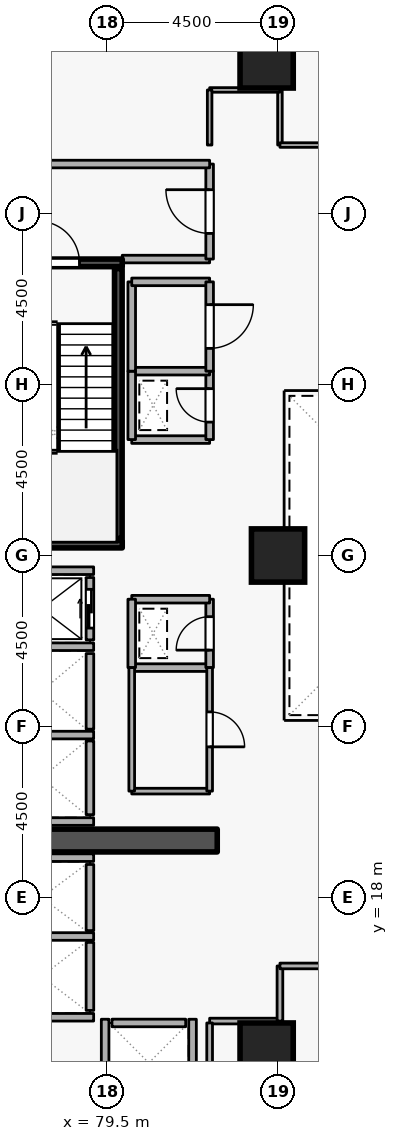
"""IFC4 building model, lengths in metres.
Left out: names, types, materials, properties, quantities, classifications, styles, units other than length and angle.
Written with IfcOpenShell. Run it as: python <this file> out.ifc"""

import sys

from ifc_helpers import new_model, si_unit, direction, frame, frame_2d, origin, origin_2d, place, context, subcontext, project, spatial, rectangle, extrude, element, fill, save


model = new_model("IFC4")
c1 = context("Model", 3, precision=1e-05, world=origin(), true_north=direction((0.0, 1.0)))
c2 = subcontext(c1, "Body", "Model", "MODEL_VIEW")
j1 = project(units=[si_unit("LENGTHUNIT", "METRE"), si_unit("PLANEANGLEUNIT", "RADIAN")], contexts=[c1])
p1 = place(None, origin())
s1 = spatial("IfcSite", under=j1, at=p1, CompositionType="ELEMENT")
p2 = place(p1, origin())
s2 = spatial("IfcBuilding", under=s1, at=p2, CompositionType="ELEMENT")
p3 = place(p2, frame((0.0, 0.0, 49.5)))
s3 = spatial("IfcBuildingStorey", under=s2, at=p3, CompositionType="ELEMENT", Elevation=49.5)
p4 = place(p3, frame((76.7, 19.5, 0.0), z_axis=(0.0, 0.0, 1.0), x_axis=(1.0, 0.0, 0.0)))
e1 = element("IfcWall", 1, at=p4, inside=s3, PredefinedType="SHEAR", context=c2, shape_type="SweptSolid", body=[
    extrude(rectangle(XDim=5.7, YDim=0.6, at=frame_2d((2.85, 0.0))), origin(), (0.0, 0.0, 1.0), 4.2),
])
for number, where, z_axis, x_axis in (
    (2, (83.7, 14.0, 0.0), (0.0, 0.0, 1.0), (1.0, 0.0, 0.0)),
    (3, (83.7, 40.0, 0.0), (0.0, 0.0, 1.0), (1.0, 0.0, 0.0)),
    (4, (84.0, 27.0, 0.0), (0.0, 0.0, 1.0), (1.0, 0.0, 0.0)),
):
    element("IfcColumn", number, at=place(p3, frame(where, z_axis=z_axis, x_axis=x_axis)), inside=s3, PredefinedType="COLUMN", context=c2, shape_type="SweptSolid", body=[
        extrude(rectangle(XDim=1.4, YDim=1.4, at=origin_2d()), origin(), (0.0, 0.0, 1.0), 4.2),
    ])
p5 = place(p3, frame((79.05, 24.78, 0.0), z_axis=(0.0, 0.0, 1.0), x_axis=(0.0, 1.0, 0.0)))
e5 = element("IfcWall", 5, at=p5, inside=s3, PredefinedType="STANDARD", context=c2, shape_type="SweptSolid", body=[
    extrude(rectangle(XDim=1.64, YDim=0.2, at=frame_2d((0.82, 0.0))), origin(), (0.0, 0.0, 1.0), 3.94),
])
p6 = place(p5, frame((0.31, 0.0, 0.0)))
e6 = element("IfcOpeningElement", 6, at=p6, cuts=e5, PredefinedType="OPENING", context=c2, shape_type="SweptSolid", body=[
    extrude(rectangle(XDim=1.02, YDim=2.06, at=frame_2d((0.51, 1.03))), frame((0.0, 0.11, 0.0), z_axis=(0.0, -1.0, 0.0), x_axis=(1.0, 0.0, 0.0)), (0.0, 0.0, 1.0), 0.22),
])
p7 = place(p3, frame((79.05, 22.43, 0.0), z_axis=(0.0, 0.0, 1.0), x_axis=(0.0, 1.0, 0.0)))
e7 = element("IfcWall", 7, at=p7, inside=s3, PredefinedType="STANDARD", context=c2, shape_type="SweptSolid", body=[
    extrude(rectangle(XDim=1.99, YDim=0.2, at=frame_2d((0.995, 0.0))), origin(), (0.0, 0.0, 1.0), 3.94),
])
p8 = place(p3, frame((79.05, 20.18, 0.0), z_axis=(0.0, 0.0, 1.0), x_axis=(0.0, 1.0, 0.0)))
e8 = element("IfcWall", 8, at=p8, inside=s3, PredefinedType="STANDARD", context=c2, shape_type="SweptSolid", body=[
    extrude(rectangle(XDim=1.94, YDim=0.2, at=frame_2d((0.97, 0.0))), origin(), (0.0, 0.0, 1.0), 3.94),
])
p9 = place(p3, frame((79.05, 17.13, 0.0), z_axis=(0.0, 0.0, 1.0), x_axis=(0.0, 1.0, 0.0)))
e9 = element("IfcWall", 9, at=p9, inside=s3, PredefinedType="STANDARD", context=c2, shape_type="SweptSolid", body=[
    extrude(rectangle(XDim=1.74, YDim=0.2, at=frame_2d((0.87, 0.0))), origin(), (0.0, 0.0, 1.0), 3.94),
])
p10 = place(p3, frame((79.05, 15.03, 0.0), z_axis=(0.0, 0.0, 1.0), x_axis=(0.0, 1.0, 0.0)))
e10 = element("IfcWall", 10, at=p10, inside=s3, PredefinedType="STANDARD", context=c2, shape_type="SweptSolid", body=[
    extrude(rectangle(XDim=1.79, YDim=0.2, at=frame_2d((0.895, 0.0))), origin(), (0.0, 0.0, 1.0), 3.94),
])
p11 = place(p3, frame((79.63, 14.7, 0.0), z_axis=(0.0, 0.0, 1.0), x_axis=(1.0, 0.0, 0.0)))
e11 = element("IfcWall", 11, at=p11, inside=s3, PredefinedType="STANDARD", context=c2, shape_type="SweptSolid", body=[
    extrude(rectangle(XDim=1.94, YDim=0.2, at=frame_2d((0.97, 0.0))), origin(), (0.0, 0.0, 1.0), 3.94),
])
for number, where, z_axis, x_axis in (
    (12, (76.712, 26.6, 0.0), (0.0, 0.0, 1.0), (1.0, 0.0, 0.0)),
    (13, (76.712, 24.6, 0.0), (0.0, 0.0, 1.0), (1.0, 0.0, 0.0)),
    (14, (76.712, 22.275, 0.0), (0.0, 0.0, 1.0), (1.0, 0.0, 0.0)),
    (15, (76.712, 20.0, 0.0), (0.0, 0.0, 1.0), (1.0, 0.0, 0.0)),
):
    element("IfcWall", number, at=place(p3, frame(where, z_axis=z_axis, x_axis=x_axis)), inside=s3, PredefinedType="STANDARD", context=c2, shape_type="SweptSolid", body=[
        extrude(rectangle(XDim=2.436, YDim=0.2, at=frame_2d((1.218, 0.0))), origin(), (0.0, 0.0, 1.0), 3.94),
    ])
p12 = place(p3, frame((76.402, 19.05, 0.0), z_axis=(0.0, 0.0, 1.0), x_axis=(1.0, 0.0, 0.0)))
e16 = element("IfcWall", 16, at=p12, inside=s3, PredefinedType="STANDARD", context=c2, shape_type="SweptSolid", body=[
    extrude(rectangle(XDim=2.746, YDim=0.2, at=frame_2d((1.373, 0.0))), origin(), (0.0, 0.0, 1.0), 3.145),
])
p13 = place(p3, frame((76.402, 16.975, 0.0), z_axis=(0.0, 0.0, 1.0), x_axis=(1.0, 0.0, 0.0)))
e17 = element("IfcWall", 17, at=p13, inside=s3, PredefinedType="STANDARD", context=c2, shape_type="SweptSolid", body=[
    extrude(rectangle(XDim=2.746, YDim=0.2, at=frame_2d((1.373, 0.0))), origin(), (0.0, 0.0, 1.0), 3.94),
])
p14 = place(p3, frame((76.512, 14.85, 0.0), z_axis=(0.0, 0.0, 1.0), x_axis=(1.0, 0.0, 0.0)))
e18 = element("IfcWall", 18, at=p14, inside=s3, PredefinedType="STANDARD", context=c2, shape_type="SweptSolid", body=[
    extrude(rectangle(XDim=2.636, YDim=0.2, at=frame_2d((1.318, 0.0))), origin(), (0.0, 0.0, 1.0), 3.94),
])
for number, where, z_axis, x_axis in (
    (19, (81.75, 12.612, 0.0), (0.0, 0.0, 1.0), (0.0, 1.0, 0.0)),
    (20, (79.45, 12.612, 0.0), (0.0, 0.0, 1.0), (0.0, 1.0, 0.0)),
):
    element("IfcWall", number, at=place(p3, frame(where, z_axis=z_axis, x_axis=x_axis)), inside=s3, PredefinedType="STANDARD", context=c2, shape_type="SweptSolid", body=[
        extrude(rectangle(XDim=2.186, YDim=0.2, at=frame_2d((1.093, 0.0))), origin(), (0.0, 0.0, 1.0), 3.94),
    ])
p15 = place(p3, frame((76.55, 34.7, 0.0), z_axis=(0.0, 0.0, 1.0), x_axis=(1.0, 0.0, 0.0)))
e21 = element("IfcWall", 21, at=p15, inside=s3, PredefinedType="SHEAR", context=c2, shape_type="SweptSolid", body=[
    extrude(rectangle(XDim=3.35, YDim=0.2, at=frame_2d((1.675, 0.0))), origin(), (0.0, 0.0, 1.0), 4.2),
])
p16 = place(p15, frame((1.125, 0.0, 0.0)))
e22 = element("IfcOpeningElement", 22, at=p16, cuts=e21, PredefinedType="OPENING", context=c2, shape_type="SweptSolid", body=[
    extrude(rectangle(XDim=1.1, YDim=2.1, at=frame_2d((0.55, 1.05))), frame((0.0, 0.11, 0.0), z_axis=(0.0, -1.0, 0.0), x_axis=(1.0, 0.0, 0.0)), (0.0, 0.0, 1.0), 0.22),
])
p17 = place(p3, frame((79.9, 27.3, 0.0), z_axis=(0.0, 0.0, 1.0), x_axis=(-1.0, 0.0, 0.0)))
e23 = element("IfcWall", 23, at=p17, inside=s3, PredefinedType="SHEAR", context=c2, shape_type="SweptSolid", body=[
    extrude(rectangle(XDim=3.35, YDim=0.2, at=frame_2d((1.675, 0.0))), origin(), (0.0, 0.0, 1.0), 4.2),
])
p18 = place(p3, frame((79.797, 27.45, 0.0), z_axis=(0.0, 0.0, 1.0), x_axis=(0.0, 1.0, 0.0)))
e24 = element("IfcWall", 24, at=p18, inside=s3, PredefinedType="SHEAR", context=c2, shape_type="SweptSolid", body=[
    extrude(rectangle(XDim=7.1, YDim=0.2, at=frame_2d((3.55, 0.0))), origin(), (0.0, 0.0, 1.0), 4.2),
])
p19 = place(p3, frame((79.9, 34.8, 0.0), z_axis=(0.0, 0.0, 1.0), x_axis=(1.0, 0.0, 0.0)))
e25 = element("IfcWall", 25, at=p19, inside=s3, PredefinedType="STANDARD", context=c2, shape_type="SweptSolid", body=[
    extrude(rectangle(XDim=2.3, YDim=0.2, at=frame_2d((1.15, 0.0))), origin(), (0.0, 0.0, 1.0), 3.145),
])
p20 = place(p3, frame((82.2, 34.8, 0.0), z_axis=(0.0, 0.0, 1.0), x_axis=(0.0, 1.0, 0.0)))
e26 = element("IfcWall", 26, at=p20, inside=s3, PredefinedType="STANDARD", context=c2, shape_type="SweptSolid", body=[
    extrude(rectangle(XDim=2.5, YDim=0.2, at=frame_2d((1.25, 0.0))), origin(), (0.0, 0.0, 1.0), 3.94),
])
p21 = place(p20, frame((0.675, 0.0, 0.0)))
e27 = element("IfcOpeningElement", 27, at=p21, cuts=e26, PredefinedType="OPENING", context=c2, shape_type="SweptSolid", body=[
    extrude(rectangle(XDim=1.15, YDim=2.1, at=frame_2d((0.575, 1.05))), frame((0.0, 0.11, 0.0), z_axis=(0.0, -1.0, 0.0), x_axis=(1.0, 0.0, 0.0)), (0.0, 0.0, 1.0), 0.22),
])
p22 = place(p3, frame((82.2, 37.3, 0.0), z_axis=(0.0, 0.0, 1.0), x_axis=(-1.0, 0.0, 0.0)))
e28 = element("IfcWall", 28, at=p22, inside=s3, PredefinedType="STANDARD", context=c2, shape_type="SweptSolid", body=[
    extrude(rectangle(XDim=5.7, YDim=0.2, at=frame_2d((2.85, 0.0))), origin(), (0.0, 0.0, 1.0), 3.94),
])
p23 = place(p3, frame((80.15, 24.05, 0.0), z_axis=(0.0, 0.0, 1.0), x_axis=(1.0, 0.0, 0.0)))
e29 = element("IfcWall", 29, at=p23, inside=s3, PredefinedType="STANDARD", context=c2, shape_type="SweptSolid", body=[
    extrude(rectangle(XDim=2.05, YDim=0.2, at=frame_2d((1.025, 0.0))), origin(), (0.0, 0.0, 1.0), 3.94),
])
p24 = place(p3, frame((82.2, 24.05, 0.0), z_axis=(0.0, 0.0, 1.0), x_axis=(0.0, 1.0, 0.0)))
e30 = element("IfcWall", 30, at=p24, inside=s3, PredefinedType="STANDARD", context=c2, shape_type="SweptSolid", body=[
    extrude(rectangle(XDim=1.8, YDim=0.2, at=frame_2d((0.9, 0.0))), origin(), (0.0, 0.0, 1.0), 3.94),
])
p25 = place(p24, frame((0.46, 0.0, 0.0)))
e31 = element("IfcOpeningElement", 31, at=p25, cuts=e30, PredefinedType="OPENING", context=c2, shape_type="SweptSolid", body=[
    extrude(rectangle(XDim=0.88, YDim=2.04, at=frame_2d((0.44, 1.02))), frame((0.0, 0.11, 0.0), z_axis=(0.0, -1.0, 0.0), x_axis=(1.0, 0.0, 0.0)), (0.0, 0.0, 1.0), 0.22),
])
p26 = place(p3, frame((82.2, 25.85, 0.0), z_axis=(0.0, 0.0, 1.0), x_axis=(-1.0, 0.0, 0.0)))
e32 = element("IfcWall", 32, at=p26, inside=s3, PredefinedType="STANDARD", context=c2, shape_type="SweptSolid", body=[
    extrude(rectangle(XDim=2.05, YDim=0.2, at=frame_2d((1.025, 0.0))), origin(), (0.0, 0.0, 1.0), 3.94),
])
p27 = place(p3, frame((80.15, 25.85, 0.0), z_axis=(0.0, 0.0, 1.0), x_axis=(0.0, -1.0, 0.0)))
e33 = element("IfcWall", 33, at=p27, inside=s3, PredefinedType="STANDARD", context=c2, shape_type="SweptSolid", body=[
    extrude(rectangle(XDim=1.8, YDim=0.2, at=frame_2d((0.9, 0.0))), origin(), (0.0, 0.0, 1.0), 3.94),
])
p28 = place(p3, frame((80.15, 30.05, 0.0), z_axis=(0.0, 0.0, 1.0), x_axis=(1.0, 0.0, 0.0)))
e34 = element("IfcWall", 34, at=p28, inside=s3, PredefinedType="STANDARD", context=c2, shape_type="SweptSolid", body=[
    extrude(rectangle(XDim=2.05, YDim=0.2, at=frame_2d((1.025, 0.0))), origin(), (0.0, 0.0, 1.0), 3.94),
])
p29 = place(p3, frame((82.2, 30.05, 0.0), z_axis=(0.0, 0.0, 1.0), x_axis=(0.0, 1.0, 0.0)))
e35 = element("IfcWall", 35, at=p29, inside=s3, PredefinedType="STANDARD", context=c2, shape_type="SweptSolid", body=[
    extrude(rectangle(XDim=1.8, YDim=0.2, at=frame_2d((0.9, 0.0))), origin(), (0.0, 0.0, 1.0), 3.94),
])
p30 = place(p29, frame((0.46, 0.0, 0.0)))
e36 = element("IfcOpeningElement", 36, at=p30, cuts=e35, PredefinedType="OPENING", context=c2, shape_type="SweptSolid", body=[
    extrude(rectangle(XDim=0.88, YDim=2.04, at=frame_2d((0.44, 1.02))), frame((0.0, 0.11, 0.0), z_axis=(0.0, -1.0, 0.0), x_axis=(1.0, 0.0, 0.0)), (0.0, 0.0, 1.0), 0.22),
])
p31 = place(p3, frame((82.2, 31.85, 0.0), z_axis=(0.0, 0.0, 1.0), x_axis=(-1.0, 0.0, 0.0)))
e37 = element("IfcWall", 37, at=p31, inside=s3, PredefinedType="STANDARD", context=c2, shape_type="SweptSolid", body=[
    extrude(rectangle(XDim=2.05, YDim=0.2, at=frame_2d((1.025, 0.0))), origin(), (0.0, 0.0, 1.0), 3.94),
])
p32 = place(p3, frame((80.15, 31.85, 0.0), z_axis=(0.0, 0.0, 1.0), x_axis=(0.0, -1.0, 0.0)))
e38 = element("IfcWall", 38, at=p32, inside=s3, PredefinedType="STANDARD", context=c2, shape_type="SweptSolid", body=[
    extrude(rectangle(XDim=1.8, YDim=0.2, at=frame_2d((0.9, 0.0))), origin(), (0.0, 0.0, 1.0), 3.94),
])
p33 = place(p3, frame((80.15, 31.85, 0.0), z_axis=(0.0, 0.0, 1.0), x_axis=(0.0, 1.0, 0.0)))
e39 = element("IfcWall", 39, at=p33, inside=s3, PredefinedType="STANDARD", context=c2, shape_type="SweptSolid", body=[
    extrude(rectangle(XDim=2.35, YDim=0.2, at=frame_2d((1.175, 0.0))), origin(), (0.0, 0.0, 1.0), 3.94),
])
p34 = place(p3, frame((80.15, 34.2, 0.0), z_axis=(0.0, 0.0, 1.0), x_axis=(1.0, 0.0, 0.0)))
e40 = element("IfcWall", 40, at=p34, inside=s3, PredefinedType="STANDARD", context=c2, shape_type="SweptSolid", body=[
    extrude(rectangle(XDim=2.05, YDim=0.2, at=frame_2d((1.025, 0.0))), origin(), (0.0, 0.0, 1.0), 3.145),
])
p35 = place(p3, frame((82.2, 34.2, 0.0), z_axis=(0.0, 0.0, 1.0), x_axis=(0.0, -1.0, 0.0)))
e41 = element("IfcWall", 41, at=p35, inside=s3, PredefinedType="STANDARD", context=c2, shape_type="SweptSolid", body=[
    extrude(rectangle(XDim=2.35, YDim=0.2, at=frame_2d((1.175, 0.0))), origin(), (0.0, 0.0, 1.0), 3.94),
])
p36 = place(p35, frame((0.6, 0.0, 0.0)))
e42 = element("IfcOpeningElement", 42, at=p36, cuts=e41, PredefinedType="OPENING", context=c2, shape_type="SweptSolid", body=[
    extrude(rectangle(XDim=1.15, YDim=2.1, at=frame_2d((0.575, 1.05))), frame((0.0, 0.11, 0.0), z_axis=(0.0, -1.0, 0.0), x_axis=(1.0, 0.0, 0.0)), (0.0, 0.0, 1.0), 0.22),
])
p37 = place(p3, frame((82.2, 20.8, 0.0), z_axis=(0.0, 0.0, 1.0), x_axis=(-1.0, 0.0, 0.0)))
e43 = element("IfcWall", 43, at=p37, inside=s3, PredefinedType="PARTITIONING", context=c2, shape_type="SweptSolid", body=[
    extrude(rectangle(XDim=2.05, YDim=0.15, at=frame_2d((1.025, 0.0))), origin(), (0.0, 0.0, 1.0), 3.94),
])
p38 = place(p3, frame((80.15, 20.8, 0.0), z_axis=(0.0, 0.0, 1.0), x_axis=(0.0, 1.0, 0.0)))
e44 = element("IfcWall", 44, at=p38, inside=s3, PredefinedType="PARTITIONING", context=c2, shape_type="SweptSolid", body=[
    extrude(rectangle(XDim=3.25, YDim=0.15, at=frame_2d((1.625, 0.0))), origin(), (0.0, 0.0, 1.0), 3.94),
])
p39 = place(p3, frame((82.2, 24.05, 0.0), z_axis=(0.0, 0.0, 1.0), x_axis=(0.0, -1.0, 0.0)))
e45 = element("IfcWall", 45, at=p39, inside=s3, PredefinedType="PARTITIONING", context=c2, shape_type="SweptSolid", body=[
    extrude(rectangle(XDim=3.25, YDim=0.15, at=frame_2d((1.625, 0.0))), origin(), (0.0, 0.0, 1.0), 3.94),
])
p40 = place(p39, frame((1.165, 0.0, 0.0)))
e46 = element("IfcOpeningElement", 46, at=p40, cuts=e45, PredefinedType="OPENING", context=c2, shape_type="SweptSolid", body=[
    extrude(rectangle(XDim=0.92, YDim=2.08, at=frame_2d((0.46, 1.04))), frame((0.0, 0.085, 0.0), z_axis=(0.0, -1.0, 0.0), x_axis=(1.0, 0.0, 0.0)), (0.0, 0.0, 1.0), 0.17),
])
p41 = place(p3, frame((82.2, 14.75, 0.0), z_axis=(0.0, 0.0, 1.0), x_axis=(1.0, 0.0, 0.0)))
e47 = element("IfcWall", 47, at=p41, inside=s3, PredefinedType="PARTITIONING", context=c2, shape_type="SweptSolid", body=[
    extrude(rectangle(XDim=1.85, YDim=0.15, at=frame_2d((0.925, 0.0))), origin(), (0.0, 0.0, 1.0), 3.94),
])
p42 = place(p3, frame((84.05, 14.75, 0.0), z_axis=(0.0, 0.0, 1.0), x_axis=(0.0, 1.0, 0.0)))
e48 = element("IfcWall", 48, at=p42, inside=s3, PredefinedType="PARTITIONING", context=c2, shape_type="SweptSolid", body=[
    extrude(rectangle(XDim=1.45, YDim=0.15, at=frame_2d((0.725, 0.0))), origin(), (0.0, 0.0, 1.0), 3.94),
])
p43 = place(p3, frame((84.05, 16.2, 0.0), z_axis=(0.0, 0.0, 1.0), x_axis=(1.0, 0.0, 0.0)))
e49 = element("IfcWall", 49, at=p43, inside=s3, PredefinedType="PARTITIONING", context=c2, shape_type="SweptSolid", body=[
    extrude(rectangle(XDim=4.45, YDim=0.15, at=frame_2d((2.225, 0.0))), origin(), (0.0, 0.0, 1.0), 3.94),
])
p44 = place(p43, frame((1.575, 0.0, 0.0)))
e50 = element("IfcOpeningElement", 50, at=p44, cuts=e49, PredefinedType="OPENING", context=c2, shape_type="SweptSolid", body=[
    extrude(rectangle(XDim=1.3, YDim=2.12, at=frame_2d((0.65, 1.06))), frame((0.0, 0.085, 0.0), z_axis=(0.0, -1.0, 0.0), x_axis=(1.0, 0.0, 0.0)), (0.0, 0.0, 1.0), 0.17),
])
p45 = place(p3, frame((82.2, 12.4, 0.0), z_axis=(0.0, 0.0, 1.0), x_axis=(0.0, 1.0, 0.0)))
e51 = element("IfcWall", 51, at=p45, inside=s3, PredefinedType="PARTITIONING", context=c2, shape_type="SweptSolid", body=[
    extrude(rectangle(XDim=2.3, YDim=0.15, at=frame_2d((1.15, 0.0))), origin(), (0.0, 0.0, 1.0), 3.94),
])
p46 = place(p3, frame((84.05, 37.8, 0.0), z_axis=(0.0, 0.0, 1.0), x_axis=(0.0, 1.0, 0.0)))
e52 = element("IfcWall", 52, at=p46, inside=s3, PredefinedType="PARTITIONING", context=c2, shape_type="SweptSolid", body=[
    extrude(rectangle(XDim=1.45, YDim=0.12, at=frame_2d((0.725, 0.0))), origin(), (0.0, 0.0, 1.0), 3.94),
])
p47 = place(p3, frame((84.05, 39.25, 0.0), z_axis=(0.0, 0.0, 1.0), x_axis=(-1.0, 0.0, 0.0)))
e53 = element("IfcWall", 53, at=p47, inside=s3, PredefinedType="PARTITIONING", context=c2, shape_type="SweptSolid", body=[
    extrude(rectangle(XDim=1.85, YDim=0.12, at=frame_2d((0.925, 0.0))), origin(), (0.0, 0.0, 1.0), 3.94),
])
p48 = place(p3, frame((82.2, 39.25, 0.0), z_axis=(0.0, 0.0, 1.0), x_axis=(0.0, -1.0, 0.0)))
e54 = element("IfcWall", 54, at=p48, inside=s3, PredefinedType="PARTITIONING", context=c2, shape_type="SweptSolid", body=[
    extrude(rectangle(XDim=1.45, YDim=0.12, at=frame_2d((0.725, 0.0))), origin(), (0.0, 0.0, 1.0), 3.94),
])
p49 = place(p3, frame((88.5, 37.8, 0.0), z_axis=(0.0, 0.0, 1.0), x_axis=(-1.0, 0.0, 0.0)))
e55 = element("IfcWall", 55, at=p49, inside=s3, PredefinedType="PARTITIONING", context=c2, shape_type="SweptSolid", body=[
    extrude(rectangle(XDim=4.45, YDim=0.12, at=frame_2d((2.225, 0.0))), origin(), (0.0, 0.0, 1.0), 3.94),
])
p50 = place(p49, frame((1.7, 0.0, 0.0)))
e56 = element("IfcOpeningElement", 56, at=p50, cuts=e55, PredefinedType="OPENING", context=c2, shape_type="SweptSolid", body=[
    extrude(rectangle(XDim=1.05, YDim=2.1, at=frame_2d((0.525, 1.05))), frame((0.0, 0.07, 0.0), z_axis=(0.0, -1.0, 0.0), x_axis=(1.0, 0.0, 0.0)), (0.0, 0.0, 1.0), 0.14),
])
p51 = place(p6, origin())
e57 = element("IfcDoor", 57, at=p51, inside=s3, OperationType="SLIDING_TO_LEFT", PredefinedType="DOOR", context=c2, shape_type="SweptSolid", body=[
    extrude(rectangle(XDim=1.02, YDim=2.06, at=frame_2d((0.51, 1.03))), frame((0.0, 0.025, 0.0), z_axis=(0.0, -1.0, 0.0), x_axis=(1.0, 0.0, 0.0)), (0.0, 0.0, 1.0), 0.05),
])
fill(e6, e57)
p52 = place(p16, origin())
e58 = element("IfcDoor", 58, at=p52, inside=s3, OperationType="SINGLE_SWING_LEFT", PredefinedType="DOOR", context=c2, shape_type="SweptSolid", body=[
    extrude(rectangle(XDim=1.1, YDim=2.1, at=frame_2d((0.55, 1.05))), frame((0.0, 0.025, 0.0), z_axis=(0.0, -1.0, 0.0), x_axis=(1.0, 0.0, 0.0)), (0.0, 0.0, 1.0), 0.05),
])
fill(e22, e58)
p53 = place(p21, origin())
e59 = element("IfcDoor", 59, at=p53, inside=s3, OperationType="SINGLE_SWING_RIGHT", PredefinedType="DOOR", context=c2, shape_type="SweptSolid", body=[
    extrude(rectangle(XDim=1.15, YDim=2.1, at=frame_2d((0.575, 1.05))), frame((0.0, 0.025, 0.0), z_axis=(0.0, -1.0, 0.0), x_axis=(1.0, 0.0, 0.0)), (0.0, 0.0, 1.0), 0.05),
])
fill(e27, e59)
p54 = place(p25, origin())
e60 = element("IfcDoor", 60, at=p54, inside=s3, OperationType="SINGLE_SWING_LEFT", PredefinedType="DOOR", context=c2, shape_type="SweptSolid", body=[
    extrude(rectangle(XDim=0.88, YDim=2.04, at=frame_2d((0.44, 1.02))), frame((0.0, 0.025, 0.0), z_axis=(0.0, -1.0, 0.0), x_axis=(1.0, 0.0, 0.0)), (0.0, 0.0, 1.0), 0.05),
])
fill(e31, e60)
p55 = place(p30, origin())
e61 = element("IfcDoor", 61, at=p55, inside=s3, OperationType="SINGLE_SWING_RIGHT", PredefinedType="DOOR", context=c2, shape_type="SweptSolid", body=[
    extrude(rectangle(XDim=0.88, YDim=2.04, at=frame_2d((0.44, 1.02))), frame((0.0, 0.025, 0.0), z_axis=(0.0, -1.0, 0.0), x_axis=(1.0, 0.0, 0.0)), (0.0, 0.0, 1.0), 0.05),
])
fill(e36, e61)
p56 = place(p40, origin())
e62 = element("IfcDoor", 62, at=p56, inside=s3, OperationType="SINGLE_SWING_RIGHT", PredefinedType="DOOR", context=c2, shape_type="SweptSolid", body=[
    extrude(rectangle(XDim=0.92, YDim=2.08, at=frame_2d((0.46, 1.04))), frame((0.0, 0.025, 0.0), z_axis=(0.0, -1.0, 0.0), x_axis=(1.0, 0.0, 0.0)), (0.0, 0.0, 1.0), 0.05),
])
fill(e46, e62)
p57 = place(p36, origin())
e63 = element("IfcDoor", 63, at=p57, inside=s3, OperationType="SINGLE_SWING_LEFT", PredefinedType="DOOR", context=c2, shape_type="SweptSolid", body=[
    extrude(rectangle(XDim=1.15, YDim=2.1, at=frame_2d((0.575, 1.05))), frame((0.0, 0.025, 0.0), z_axis=(0.0, -1.0, 0.0), x_axis=(1.0, 0.0, 0.0)), (0.0, 0.0, 1.0), 0.05),
])
fill(e42, e63)
save(model, sys.argv[1])
